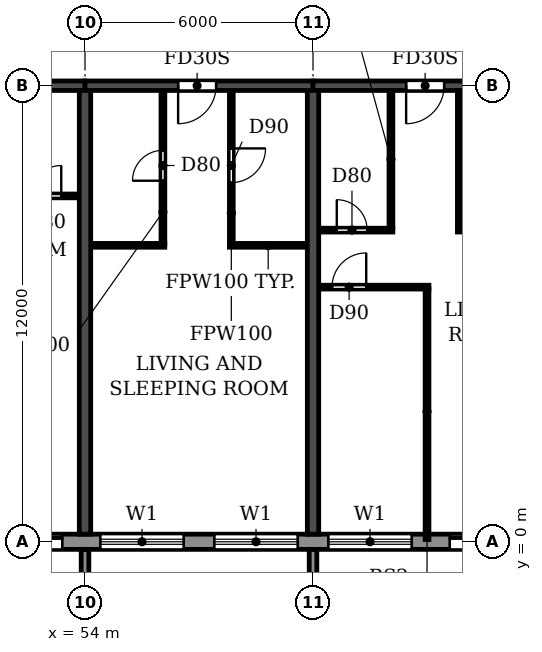
"""IFC4 building model, lengths in metres.
Left out: names, types, materials, properties, quantities, classifications, styles, units other than length and angle.
Written with IfcOpenShell. Run it as: python <this file> out.ifc"""

import sys

from ifc_helpers import new_model, si_unit, direction, frame, frame_2d, origin, place, context, subcontext, project, spatial, polyline, rectangle, outline, extrude, source, transform, mapped, element, fill, save


model = new_model("IFC4")
c1 = context("Model", 3, precision=1e-05, world=origin(), true_north=direction((0.0, 1.0)))
c2 = subcontext(c1, "Body", "Model", "MODEL_VIEW")
j1 = project(units=[si_unit("LENGTHUNIT", "METRE"), si_unit("PLANEANGLEUNIT", "RADIAN")], contexts=[c1])
p1 = place(None, origin())
s1 = spatial("IfcSite", under=j1, at=p1, CompositionType="ELEMENT")
p2 = place(p1, origin())
s2 = spatial("IfcBuilding", under=s1, at=p2, CompositionType="ELEMENT")
p3 = place(p2, frame((0.0, 0.0, 125.7)))
s3 = spatial("IfcBuildingStorey", under=s2, at=p3, CompositionType="ELEMENT", Elevation=125.7)
for number, where, z_axis, x_axis in (
    (1, (54.0, 0.2, 0.0), (0.0, 0.0, 1.0), (0.0, 1.0, 0.0)),
    (2, (60.0, 0.2, 0.0), (0.0, 0.0, 1.0), (0.0, 1.0, 0.0)),
):
    element("IfcWall", number, at=place(p3, frame(where, z_axis=z_axis, x_axis=x_axis)), inside=s3, PredefinedType="SHEAR", context=c2, shape_type="SweptSolid", body=[
        extrude(rectangle(XDim=11.675, YDim=0.3, at=frame_2d((5.837, 0.0))), origin(), (0.0, 0.0, 1.0), 3.07),
    ])
p4 = place(p3, frame((48.0, 12.0, 0.0), z_axis=(0.0, 0.0, 1.0), x_axis=(1.0, 0.0, 0.0)))
e3 = element("IfcWall", 3, at=p4, inside=s3, PredefinedType="SHEAR", context=c2, shape_type="SweptSolid", body=[
    extrude(rectangle(XDim=6.0, YDim=0.25, at=frame_2d((3.0, 0.0))), origin(), (0.0, 0.0, 1.0), 2.47),
])
p5 = place(p4, frame((2.55, 0.0, 0.0)))
e4 = element("IfcOpeningElement", 4, at=p5, cuts=e3, PredefinedType="OPENING", context=c2, shape_type="SweptSolid", body=[
    extrude(rectangle(XDim=1.0, YDim=2.1, at=frame_2d((0.5, 1.05))), frame((0.0, 0.135, 0.0), z_axis=(0.0, -1.0, 0.0), x_axis=(1.0, 0.0, 0.0)), (0.0, 0.0, 1.0), 0.27),
])
p6 = place(p3, frame((54.0, 12.0, 0.0), z_axis=(0.0, 0.0, 1.0), x_axis=(1.0, 0.0, 0.0)))
e5 = element("IfcWall", 5, at=p6, inside=s3, PredefinedType="SHEAR", context=c2, shape_type="SweptSolid", body=[
    extrude(rectangle(XDim=6.0, YDim=0.25, at=frame_2d((3.0, 0.0))), origin(), (0.0, 0.0, 1.0), 2.47),
])
p7 = place(p6, frame((2.45, 0.0, 0.0)))
e6 = element("IfcOpeningElement", 6, at=p7, cuts=e5, PredefinedType="OPENING", context=c2, shape_type="SweptSolid", body=[
    extrude(rectangle(XDim=1.0, YDim=2.1, at=frame_2d((0.5, 1.05))), frame((0.0, 0.135, 0.0), z_axis=(0.0, -1.0, 0.0), x_axis=(1.0, 0.0, 0.0)), (0.0, 0.0, 1.0), 0.27),
])
p8 = place(p3, frame((60.0, 12.0, 0.0), z_axis=(0.0, 0.0, 1.0), x_axis=(1.0, 0.0, 0.0)))
e7 = element("IfcWall", 7, at=p8, inside=s3, PredefinedType="SHEAR", context=c2, shape_type="SweptSolid", body=[
    extrude(rectangle(XDim=6.0, YDim=0.25, at=frame_2d((3.0, 0.0))), origin(), (0.0, 0.0, 1.0), 2.47),
])
p9 = place(p8, frame((2.45, 0.0, 0.0)))
e8 = element("IfcOpeningElement", 8, at=p9, cuts=e7, PredefinedType="OPENING", context=c2, shape_type="SweptSolid", body=[
    extrude(rectangle(XDim=1.0, YDim=2.1, at=frame_2d((0.5, 1.05))), frame((0.0, 0.135, 0.0), z_axis=(0.0, -1.0, 0.0), x_axis=(1.0, 0.0, 0.0)), (0.0, 0.0, 1.0), 0.27),
])
p10 = place(p3, frame((16.683, 0.0, 0.0), z_axis=(0.0, 0.0, 1.0), x_axis=(1.0, 0.0, 0.0)))
e9 = element("IfcWall", 9, at=p10, inside=s3, PredefinedType="STANDARD", context=c2, shape_type="SweptSolid", body=[
    extrude(rectangle(XDim=68.634, YDim=0.4, at=frame_2d((34.317, 0.0))), origin(), (0.0, 0.0, 1.0), 3.07),
])
p11 = place(p10, frame((1.717, 0.0, 0.9)))
e10 = element("IfcOpeningElement", 10, at=p11, cuts=e9, PredefinedType="OPENING", context=c2, shape_type="SweptSolid", body=[
    extrude(rectangle(XDim=2.2, YDim=1.5, at=frame_2d((1.1, 0.75))), frame((0.0, 0.21, 0.0), z_axis=(0.0, -1.0, 0.0), x_axis=(1.0, 0.0, 0.0)), (0.0, 0.0, 1.0), 0.42),
])
p12 = place(p10, frame((4.717, 0.0, 0.9)))
e11 = element("IfcOpeningElement", 11, at=p12, cuts=e9, PredefinedType="OPENING", context=c2, shape_type="SweptSolid", body=[
    extrude(rectangle(XDim=2.2, YDim=1.5, at=frame_2d((1.1, 0.75))), frame((0.0, 0.21, 0.0), z_axis=(0.0, -1.0, 0.0), x_axis=(1.0, 0.0, 0.0)), (0.0, 0.0, 1.0), 0.42),
])
p13 = place(p10, frame((7.717, 0.0, 0.9)))
e12 = element("IfcOpeningElement", 12, at=p13, cuts=e9, PredefinedType="OPENING", context=c2, shape_type="SweptSolid", body=[
    extrude(rectangle(XDim=2.2, YDim=1.5, at=frame_2d((1.1, 0.75))), frame((0.0, 0.21, 0.0), z_axis=(0.0, -1.0, 0.0), x_axis=(1.0, 0.0, 0.0)), (0.0, 0.0, 1.0), 0.42),
])
p14 = place(p10, frame((10.717, 0.0, 0.9)))
e13 = element("IfcOpeningElement", 13, at=p14, cuts=e9, PredefinedType="OPENING", context=c2, shape_type="SweptSolid", body=[
    extrude(rectangle(XDim=2.2, YDim=1.5, at=frame_2d((1.1, 0.75))), frame((0.0, 0.21, 0.0), z_axis=(0.0, -1.0, 0.0), x_axis=(1.0, 0.0, 0.0)), (0.0, 0.0, 1.0), 0.42),
])
p15 = place(p10, frame((13.717, 0.0, 0.9)))
e14 = element("IfcOpeningElement", 14, at=p15, cuts=e9, PredefinedType="OPENING", context=c2, shape_type="SweptSolid", body=[
    extrude(rectangle(XDim=2.2, YDim=1.5, at=frame_2d((1.1, 0.75))), frame((0.0, 0.21, 0.0), z_axis=(0.0, -1.0, 0.0), x_axis=(1.0, 0.0, 0.0)), (0.0, 0.0, 1.0), 0.42),
])
p16 = place(p10, frame((16.717, 0.0, 0.9)))
e15 = element("IfcOpeningElement", 15, at=p16, cuts=e9, PredefinedType="OPENING", context=c2, shape_type="SweptSolid", body=[
    extrude(rectangle(XDim=2.2, YDim=1.5, at=frame_2d((1.1, 0.75))), frame((0.0, 0.21, 0.0), z_axis=(0.0, -1.0, 0.0), x_axis=(1.0, 0.0, 0.0)), (0.0, 0.0, 1.0), 0.42),
])
p17 = place(p10, frame((19.717, 0.0, 0.9)))
e16 = element("IfcOpeningElement", 16, at=p17, cuts=e9, PredefinedType="OPENING", context=c2, shape_type="SweptSolid", body=[
    extrude(rectangle(XDim=2.2, YDim=1.5, at=frame_2d((1.1, 0.75))), frame((0.0, 0.21, 0.0), z_axis=(0.0, -1.0, 0.0), x_axis=(1.0, 0.0, 0.0)), (0.0, 0.0, 1.0), 0.42),
])
p18 = place(p10, frame((22.917, 0.0, 0.0)))
e17 = element("IfcOpeningElement", 17, at=p18, cuts=e9, PredefinedType="OPENING", context=c2, shape_type="SweptSolid", body=[
    extrude(rectangle(XDim=1.8, YDim=2.4, at=frame_2d((0.9, 1.2))), frame((0.0, 0.21, 0.0), z_axis=(0.0, -1.0, 0.0), x_axis=(1.0, 0.0, 0.0)), (0.0, 0.0, 1.0), 0.42),
])
p19 = place(p10, frame((25.717, 0.0, 0.9)))
e18 = element("IfcOpeningElement", 18, at=p19, cuts=e9, PredefinedType="OPENING", context=c2, shape_type="SweptSolid", body=[
    extrude(rectangle(XDim=2.2, YDim=1.5, at=frame_2d((1.1, 0.75))), frame((0.0, 0.21, 0.0), z_axis=(0.0, -1.0, 0.0), x_axis=(1.0, 0.0, 0.0)), (0.0, 0.0, 1.0), 0.42),
])
p20 = place(p10, frame((28.717, 0.0, 0.9)))
e19 = element("IfcOpeningElement", 19, at=p20, cuts=e9, PredefinedType="OPENING", context=c2, shape_type="SweptSolid", body=[
    extrude(rectangle(XDim=2.2, YDim=1.5, at=frame_2d((1.1, 0.75))), frame((0.0, 0.21, 0.0), z_axis=(0.0, -1.0, 0.0), x_axis=(1.0, 0.0, 0.0)), (0.0, 0.0, 1.0), 0.42),
])
p21 = place(p10, frame((31.717, 0.0, 0.9)))
e20 = element("IfcOpeningElement", 20, at=p21, cuts=e9, PredefinedType="OPENING", context=c2, shape_type="SweptSolid", body=[
    extrude(rectangle(XDim=2.2, YDim=1.5, at=frame_2d((1.1, 0.75))), frame((0.0, 0.21, 0.0), z_axis=(0.0, -1.0, 0.0), x_axis=(1.0, 0.0, 0.0)), (0.0, 0.0, 1.0), 0.42),
])
p22 = place(p10, frame((34.917, 0.0, 0.0)))
e21 = element("IfcOpeningElement", 21, at=p22, cuts=e9, PredefinedType="OPENING", context=c2, shape_type="SweptSolid", body=[
    extrude(rectangle(XDim=1.8, YDim=2.4, at=frame_2d((0.9, 1.2))), frame((0.0, 0.21, 0.0), z_axis=(0.0, -1.0, 0.0), x_axis=(1.0, 0.0, 0.0)), (0.0, 0.0, 1.0), 0.42),
])
p23 = place(p10, frame((37.717, 0.0, 0.9)))
e22 = element("IfcOpeningElement", 22, at=p23, cuts=e9, PredefinedType="OPENING", context=c2, shape_type="SweptSolid", body=[
    extrude(rectangle(XDim=2.2, YDim=1.5, at=frame_2d((1.1, 0.75))), frame((0.0, 0.21, 0.0), z_axis=(0.0, -1.0, 0.0), x_axis=(1.0, 0.0, 0.0)), (0.0, 0.0, 1.0), 0.42),
])
p24 = place(p10, frame((40.717, 0.0, 0.9)))
e23 = element("IfcOpeningElement", 23, at=p24, cuts=e9, PredefinedType="OPENING", context=c2, shape_type="SweptSolid", body=[
    extrude(rectangle(XDim=2.2, YDim=1.5, at=frame_2d((1.1, 0.75))), frame((0.0, 0.21, 0.0), z_axis=(0.0, -1.0, 0.0), x_axis=(1.0, 0.0, 0.0)), (0.0, 0.0, 1.0), 0.42),
])
p25 = place(p10, frame((43.717, 0.0, 0.9)))
e24 = element("IfcOpeningElement", 24, at=p25, cuts=e9, PredefinedType="OPENING", context=c2, shape_type="SweptSolid", body=[
    extrude(rectangle(XDim=2.2, YDim=1.5, at=frame_2d((1.1, 0.75))), frame((0.0, 0.21, 0.0), z_axis=(0.0, -1.0, 0.0), x_axis=(1.0, 0.0, 0.0)), (0.0, 0.0, 1.0), 0.42),
])
p26 = place(p10, frame((46.917, 0.0, 0.0)))
e25 = element("IfcOpeningElement", 25, at=p26, cuts=e9, PredefinedType="OPENING", context=c2, shape_type="SweptSolid", body=[
    extrude(rectangle(XDim=1.8, YDim=2.4, at=frame_2d((0.9, 1.2))), frame((0.0, 0.21, 0.0), z_axis=(0.0, -1.0, 0.0), x_axis=(1.0, 0.0, 0.0)), (0.0, 0.0, 1.0), 0.42),
])
p27 = place(p10, frame((49.717, 0.0, 0.9)))
e26 = element("IfcOpeningElement", 26, at=p27, cuts=e9, PredefinedType="OPENING", context=c2, shape_type="SweptSolid", body=[
    extrude(rectangle(XDim=2.2, YDim=1.5, at=frame_2d((1.1, 0.75))), frame((0.0, 0.21, 0.0), z_axis=(0.0, -1.0, 0.0), x_axis=(1.0, 0.0, 0.0)), (0.0, 0.0, 1.0), 0.42),
])
p28 = place(p10, frame((52.717, 0.0, 0.9)))
e27 = element("IfcOpeningElement", 27, at=p28, cuts=e9, PredefinedType="OPENING", context=c2, shape_type="SweptSolid", body=[
    extrude(rectangle(XDim=2.2, YDim=1.5, at=frame_2d((1.1, 0.75))), frame((0.0, 0.21, 0.0), z_axis=(0.0, -1.0, 0.0), x_axis=(1.0, 0.0, 0.0)), (0.0, 0.0, 1.0), 0.42),
])
p29 = place(p10, frame((55.717, 0.0, 0.9)))
e28 = element("IfcOpeningElement", 28, at=p29, cuts=e9, PredefinedType="OPENING", context=c2, shape_type="SweptSolid", body=[
    extrude(rectangle(XDim=2.2, YDim=1.5, at=frame_2d((1.1, 0.75))), frame((0.0, 0.21, 0.0), z_axis=(0.0, -1.0, 0.0), x_axis=(1.0, 0.0, 0.0)), (0.0, 0.0, 1.0), 0.42),
])
p30 = place(p10, frame((58.917, 0.0, 0.0)))
e29 = element("IfcOpeningElement", 29, at=p30, cuts=e9, PredefinedType="OPENING", context=c2, shape_type="SweptSolid", body=[
    extrude(rectangle(XDim=1.8, YDim=2.4, at=frame_2d((0.9, 1.2))), frame((0.0, 0.21, 0.0), z_axis=(0.0, -1.0, 0.0), x_axis=(1.0, 0.0, 0.0)), (0.0, 0.0, 1.0), 0.42),
])
p31 = place(p10, frame((61.717, 0.0, 0.9)))
e30 = element("IfcOpeningElement", 30, at=p31, cuts=e9, PredefinedType="OPENING", context=c2, shape_type="SweptSolid", body=[
    extrude(rectangle(XDim=2.2, YDim=1.5, at=frame_2d((1.1, 0.75))), frame((0.0, 0.21, 0.0), z_axis=(0.0, -1.0, 0.0), x_axis=(1.0, 0.0, 0.0)), (0.0, 0.0, 1.0), 0.42),
])
p32 = place(p10, frame((64.717, 0.0, 0.9)))
e31 = element("IfcOpeningElement", 31, at=p32, cuts=e9, PredefinedType="OPENING", context=c2, shape_type="SweptSolid", body=[
    extrude(rectangle(XDim=2.2, YDim=1.5, at=frame_2d((1.1, 0.75))), frame((0.0, 0.21, 0.0), z_axis=(0.0, -1.0, 0.0), x_axis=(1.0, 0.0, 0.0)), (0.0, 0.0, 1.0), 0.42),
])
m1 = source(origin(), c2, "Body", "SweptSolid", [
    extrude(outline(polyline([(0.0, 0.0), (0.2, 0.0), (0.2, 1.65), (0.0, 1.65), (0.0, 0.0)])), origin(), (0.0, 0.0, 1.0), 3.1),
])
for number, where in (
    (32, (53.9, -1.85, 0.0)),
    (33, (59.9, -1.85, 0.0)),
):
    element("IfcWall", number, at=place(p3, frame(where)), inside=s3, PredefinedType="STANDARD", context=c2, shape_type="MappedRepresentation", body=[
        mapped(m1, transform((0.0, 0.0, 0.0))),
    ])
p33 = place(p3, frame((60.16, 6.7, 0.0), z_axis=(0.0, 0.0, 1.0), x_axis=(1.0, 0.0, 0.0)))
e34 = element("IfcWall", 34, at=p33, inside=s3, PredefinedType="PARTITIONING", context=c2, shape_type="SweptSolid", body=[
    extrude(rectangle(XDim=2.89, YDim=0.1, at=frame_2d((1.445, 0.0))), origin(), (0.0, 0.0, 1.0), 3.07),
])
p34 = place(p33, frame((0.34, 0.0, 0.0)))
e35 = element("IfcOpeningElement", 35, at=p34, cuts=e34, PredefinedType="OPENING", context=c2, shape_type="SweptSolid", body=[
    extrude(rectangle(XDim=0.9, YDim=2.1, at=frame_2d((0.45, 1.05))), frame((0.0, 0.06, 0.0), z_axis=(0.0, -1.0, 0.0), x_axis=(1.0, 0.0, 0.0)), (0.0, 0.0, 1.0), 0.12),
])
p35 = place(p3, frame((54.16, 7.8, 0.0), z_axis=(0.0, 0.0, 1.0), x_axis=(1.0, 0.0, 0.0)))
e36 = element("IfcWall", 36, at=p35, inside=s3, PredefinedType="PARTITIONING", context=c2, shape_type="SweptSolid", body=[
    extrude(rectangle(XDim=1.94, YDim=0.1, at=frame_2d((0.97, 0.0))), origin(), (0.0, 0.0, 1.0), 3.07),
])
p36 = place(p3, frame((57.8, 7.8, 0.0), z_axis=(0.0, 0.0, 1.0), x_axis=(1.0, 0.0, 0.0)))
e37 = element("IfcWall", 37, at=p36, inside=s3, PredefinedType="PARTITIONING", context=c2, shape_type="SweptSolid", body=[
    extrude(rectangle(XDim=2.04, YDim=0.1, at=frame_2d((1.02, 0.0))), origin(), (0.0, 0.0, 1.0), 3.07),
])
p37 = place(p3, frame((60.16, 8.2, 0.0), z_axis=(0.0, 0.0, 1.0), x_axis=(1.0, 0.0, 0.0)))
e38 = element("IfcWall", 38, at=p37, inside=s3, PredefinedType="PARTITIONING", context=c2, shape_type="SweptSolid", body=[
    extrude(rectangle(XDim=1.94, YDim=0.1, at=frame_2d((0.97, 0.0))), origin(), (0.0, 0.0, 1.0), 3.07),
])
p38 = place(p37, frame((0.465, 0.0, 0.0)))
e39 = element("IfcOpeningElement", 39, at=p38, cuts=e38, PredefinedType="OPENING", context=c2, shape_type="SweptSolid", body=[
    extrude(rectangle(XDim=0.8, YDim=2.1, at=frame_2d((0.4, 1.05))), frame((0.0, 0.06, 0.0), z_axis=(0.0, -1.0, 0.0), x_axis=(1.0, 0.0, 0.0)), (0.0, 0.0, 1.0), 0.12),
])
p39 = place(p3, frame((63.8, 8.2, 0.0), z_axis=(0.0, 0.0, 1.0), x_axis=(1.0, 0.0, 0.0)))
e40 = element("IfcWall", 40, at=p39, inside=s3, PredefinedType="PARTITIONING", context=c2, shape_type="SweptSolid", body=[
    extrude(rectangle(XDim=2.04, YDim=0.1, at=frame_2d((1.02, 0.0))), origin(), (0.0, 0.0, 1.0), 3.07),
])
p40 = place(p39, frame((0.675, 0.0, 0.0)))
e41 = element("IfcOpeningElement", 41, at=p40, cuts=e40, PredefinedType="OPENING", context=c2, shape_type="SweptSolid", body=[
    extrude(rectangle(XDim=0.9, YDim=2.1, at=frame_2d((0.45, 1.05))), frame((0.0, 0.06, 0.0), z_axis=(0.0, -1.0, 0.0), x_axis=(1.0, 0.0, 0.0)), (0.0, 0.0, 1.0), 0.12),
])
p41 = place(p3, frame((51.9, 9.1, 0.0), z_axis=(0.0, 0.0, 1.0), x_axis=(1.0, 0.0, 0.0)))
e42 = element("IfcWall", 42, at=p41, inside=s3, PredefinedType="PARTITIONING", context=c2, shape_type="SweptSolid", body=[
    extrude(rectangle(XDim=1.94, YDim=0.1, at=frame_2d((0.97, 0.0))), origin(), (0.0, 0.0, 1.0), 3.07),
])
p42 = place(p41, frame((0.675, 0.0, 0.0)))
e43 = element("IfcOpeningElement", 43, at=p42, cuts=e42, PredefinedType="OPENING", context=c2, shape_type="SweptSolid", body=[
    extrude(rectangle(XDim=0.8, YDim=2.1, at=frame_2d((0.4, 1.05))), frame((0.0, 0.06, 0.0), z_axis=(0.0, -1.0, 0.0), x_axis=(1.0, 0.0, 0.0)), (0.0, 0.0, 1.0), 0.12),
])
p43 = place(p3, frame((56.05, 7.85, 0.0), z_axis=(0.0, 0.0, 1.0), x_axis=(0.0, 1.0, 0.0)))
e44 = element("IfcWall", 44, at=p43, inside=s3, PredefinedType="PARTITIONING", context=c2, shape_type="SweptSolid", body=[
    extrude(rectangle(XDim=4.015, YDim=0.1, at=frame_2d((2.007, 0.0))), origin(), (0.0, 0.0, 1.0), 3.07),
])
p44 = place(p43, frame((1.65, 0.0, 0.0)))
e45 = element("IfcOpeningElement", 45, at=p44, cuts=e44, PredefinedType="OPENING", context=c2, shape_type="SweptSolid", body=[
    extrude(rectangle(XDim=0.8, YDim=2.1, at=frame_2d((0.4, 1.05))), frame((0.0, 0.06, 0.0), z_axis=(0.0, -1.0, 0.0), x_axis=(1.0, 0.0, 0.0)), (0.0, 0.0, 1.0), 0.12),
])
p45 = place(p3, frame((57.85, 7.85, 0.0), z_axis=(0.0, 0.0, 1.0), x_axis=(0.0, 1.0, 0.0)))
e46 = element("IfcWall", 46, at=p45, inside=s3, PredefinedType="PARTITIONING", context=c2, shape_type="SweptSolid", body=[
    extrude(rectangle(XDim=4.015, YDim=0.1, at=frame_2d((2.007, 0.0))), origin(), (0.0, 0.0, 1.0), 3.07),
])
p46 = place(p45, frame((1.6, 0.0, 0.0)))
e47 = element("IfcOpeningElement", 47, at=p46, cuts=e46, PredefinedType="OPENING", context=c2, shape_type="SweptSolid", body=[
    extrude(rectangle(XDim=0.9, YDim=2.1, at=frame_2d((0.45, 1.05))), frame((0.0, 0.06, 0.0), z_axis=(0.0, -1.0, 0.0), x_axis=(1.0, 0.0, 0.0)), (0.0, 0.0, 1.0), 0.12),
])
p47 = place(p3, frame((62.05, 8.25, 0.0), z_axis=(0.0, 0.0, 1.0), x_axis=(0.0, 1.0, 0.0)))
e48 = element("IfcWall", 48, at=p47, inside=s3, PredefinedType="PARTITIONING", context=c2, shape_type="SweptSolid", body=[
    extrude(rectangle(XDim=3.615, YDim=0.1, at=frame_2d((1.808, 0.0))), origin(), (0.0, 0.0, 1.0), 3.07),
])
p48 = place(p3, frame((63.0, 0.06, 0.0), z_axis=(0.0, 0.0, 1.0), x_axis=(0.0, 1.0, 0.0)))
e49 = element("IfcWall", 49, at=p48, inside=s3, PredefinedType="PARTITIONING", context=c2, shape_type="SweptSolid", body=[
    extrude(rectangle(XDim=6.59, YDim=0.1, at=frame_2d((3.295, 0.0))), origin(), (0.0, 0.0, 1.0), 3.07),
])
p49 = place(p3, frame((63.85, 8.25, 0.0), z_axis=(0.0, 0.0, 1.0), x_axis=(0.0, 1.0, 0.0)))
e50 = element("IfcWall", 50, at=p49, inside=s3, PredefinedType="PARTITIONING", context=c2, shape_type="SweptSolid", body=[
    extrude(rectangle(XDim=3.615, YDim=0.1, at=frame_2d((1.808, 0.0))), origin(), (0.0, 0.0, 1.0), 3.07),
])
p50 = place(p22, origin())
e51 = element("IfcDoor", 51, at=p50, inside=s3, OperationType="DOUBLE_DOOR_SLIDING", PredefinedType="DOOR", context=c2, shape_type="SweptSolid", body=[
    extrude(rectangle(XDim=1.8, YDim=2.4, at=frame_2d((0.9, 1.2))), frame((0.0, 0.025, 0.0), z_axis=(0.0, -1.0, 0.0), x_axis=(1.0, 0.0, 0.0)), (0.0, 0.0, 1.0), 0.05),
])
fill(e21, e51)
p51 = place(p23, origin())
e52 = element("IfcWindow", 52, at=p51, inside=s3, PartitioningType="DOUBLE_PANEL_HORIZONTAL", PredefinedType="WINDOW", context=c2, shape_type="SweptSolid", body=[
    extrude(rectangle(XDim=2.2, YDim=1.5, at=frame_2d((1.1, 0.75))), frame((0.0, 0.03, 0.0), z_axis=(0.0, -1.0, 0.0), x_axis=(1.0, 0.0, 0.0)), (0.0, 0.0, 1.0), 0.06),
])
fill(e22, e52)
p52 = place(p24, origin())
e53 = element("IfcWindow", 53, at=p52, inside=s3, PartitioningType="DOUBLE_PANEL_HORIZONTAL", PredefinedType="WINDOW", context=c2, shape_type="SweptSolid", body=[
    extrude(rectangle(XDim=2.2, YDim=1.5, at=frame_2d((1.1, 0.75))), frame((0.0, 0.03, 0.0), z_axis=(0.0, -1.0, 0.0), x_axis=(1.0, 0.0, 0.0)), (0.0, 0.0, 1.0), 0.06),
])
fill(e23, e53)
p53 = place(p25, origin())
e54 = element("IfcWindow", 54, at=p53, inside=s3, PartitioningType="DOUBLE_PANEL_HORIZONTAL", PredefinedType="WINDOW", context=c2, shape_type="SweptSolid", body=[
    extrude(rectangle(XDim=2.2, YDim=1.5, at=frame_2d((1.1, 0.75))), frame((0.0, 0.03, 0.0), z_axis=(0.0, -1.0, 0.0), x_axis=(1.0, 0.0, 0.0)), (0.0, 0.0, 1.0), 0.06),
])
fill(e24, e54)
p54 = place(p26, origin())
e55 = element("IfcDoor", 55, at=p54, inside=s3, OperationType="DOUBLE_DOOR_SLIDING", PredefinedType="DOOR", context=c2, shape_type="SweptSolid", body=[
    extrude(rectangle(XDim=1.8, YDim=2.4, at=frame_2d((0.9, 1.2))), frame((0.0, 0.025, 0.0), z_axis=(0.0, -1.0, 0.0), x_axis=(1.0, 0.0, 0.0)), (0.0, 0.0, 1.0), 0.05),
])
fill(e25, e55)
p55 = place(p42, origin())
e56 = element("IfcDoor", 56, at=p55, inside=s3, OperationType="SINGLE_SWING_RIGHT", PredefinedType="DOOR", context=c2, shape_type="SweptSolid", body=[
    extrude(rectangle(XDim=0.8, YDim=2.1, at=frame_2d((0.4, 1.05))), frame((0.0, 0.025, 0.0), z_axis=(0.0, -1.0, 0.0), x_axis=(1.0, 0.0, 0.0)), (0.0, 0.0, 1.0), 0.05),
])
fill(e43, e56)
p56 = place(p44, origin())
e57 = element("IfcDoor", 57, at=p56, inside=s3, OperationType="SINGLE_SWING_LEFT", PredefinedType="DOOR", context=c2, shape_type="SweptSolid", body=[
    extrude(rectangle(XDim=0.8, YDim=2.1, at=frame_2d((0.4, 1.05))), frame((0.0, 0.025, 0.0), z_axis=(0.0, -1.0, 0.0), x_axis=(1.0, 0.0, 0.0)), (0.0, 0.0, 1.0), 0.05),
])
fill(e45, e57)
p57 = place(p7, frame((1.0, 0.0, 0.0), z_axis=(0.0, 0.0, 1.0), x_axis=(-1.0, 0.0, 0.0)))
e58 = element("IfcDoor", 58, at=p57, inside=s3, OperationType="SINGLE_SWING_RIGHT", PredefinedType="DOOR", context=c2, shape_type="SweptSolid", body=[
    extrude(rectangle(XDim=1.0, YDim=2.1, at=frame_2d((0.5, 1.05))), frame((0.0, 0.025, 0.0), z_axis=(0.0, -1.0, 0.0), x_axis=(1.0, 0.0, 0.0)), (0.0, 0.0, 1.0), 0.05),
])
fill(e6, e58)
p58 = place(p46, frame((0.9, 0.0, 0.0), z_axis=(0.0, 0.0, 1.0), x_axis=(-1.0, 0.0, 0.0)))
e59 = element("IfcDoor", 59, at=p58, inside=s3, OperationType="SINGLE_SWING_LEFT", PredefinedType="DOOR", context=c2, shape_type="SweptSolid", body=[
    extrude(rectangle(XDim=0.9, YDim=2.1, at=frame_2d((0.45, 1.05))), frame((0.0, 0.025, 0.0), z_axis=(0.0, -1.0, 0.0), x_axis=(1.0, 0.0, 0.0)), (0.0, 0.0, 1.0), 0.05),
])
fill(e47, e59)
p59 = place(p34, origin())
e60 = element("IfcDoor", 60, at=p59, inside=s3, OperationType="SINGLE_SWING_RIGHT", PredefinedType="DOOR", context=c2, shape_type="SweptSolid", body=[
    extrude(rectangle(XDim=0.9, YDim=2.1, at=frame_2d((0.45, 1.05))), frame((0.0, 0.025, 0.0), z_axis=(0.0, -1.0, 0.0), x_axis=(1.0, 0.0, 0.0)), (0.0, 0.0, 1.0), 0.05),
])
fill(e35, e60)
p60 = place(p38, origin())
e61 = element("IfcDoor", 61, at=p60, inside=s3, OperationType="SINGLE_SWING_LEFT", PredefinedType="DOOR", context=c2, shape_type="SweptSolid", body=[
    extrude(rectangle(XDim=0.8, YDim=2.1, at=frame_2d((0.4, 1.05))), frame((0.0, 0.025, 0.0), z_axis=(0.0, -1.0, 0.0), x_axis=(1.0, 0.0, 0.0)), (0.0, 0.0, 1.0), 0.05),
])
fill(e39, e61)
p61 = place(p9, frame((1.0, 0.0, 0.0), z_axis=(0.0, 0.0, 1.0), x_axis=(-1.0, 0.0, 0.0)))
e62 = element("IfcDoor", 62, at=p61, inside=s3, OperationType="SINGLE_SWING_RIGHT", PredefinedType="DOOR", context=c2, shape_type="SweptSolid", body=[
    extrude(rectangle(XDim=1.0, YDim=2.1, at=frame_2d((0.5, 1.05))), frame((0.0, 0.025, 0.0), z_axis=(0.0, -1.0, 0.0), x_axis=(1.0, 0.0, 0.0)), (0.0, 0.0, 1.0), 0.05),
])
fill(e8, e62)
save(model, sys.argv[1])
